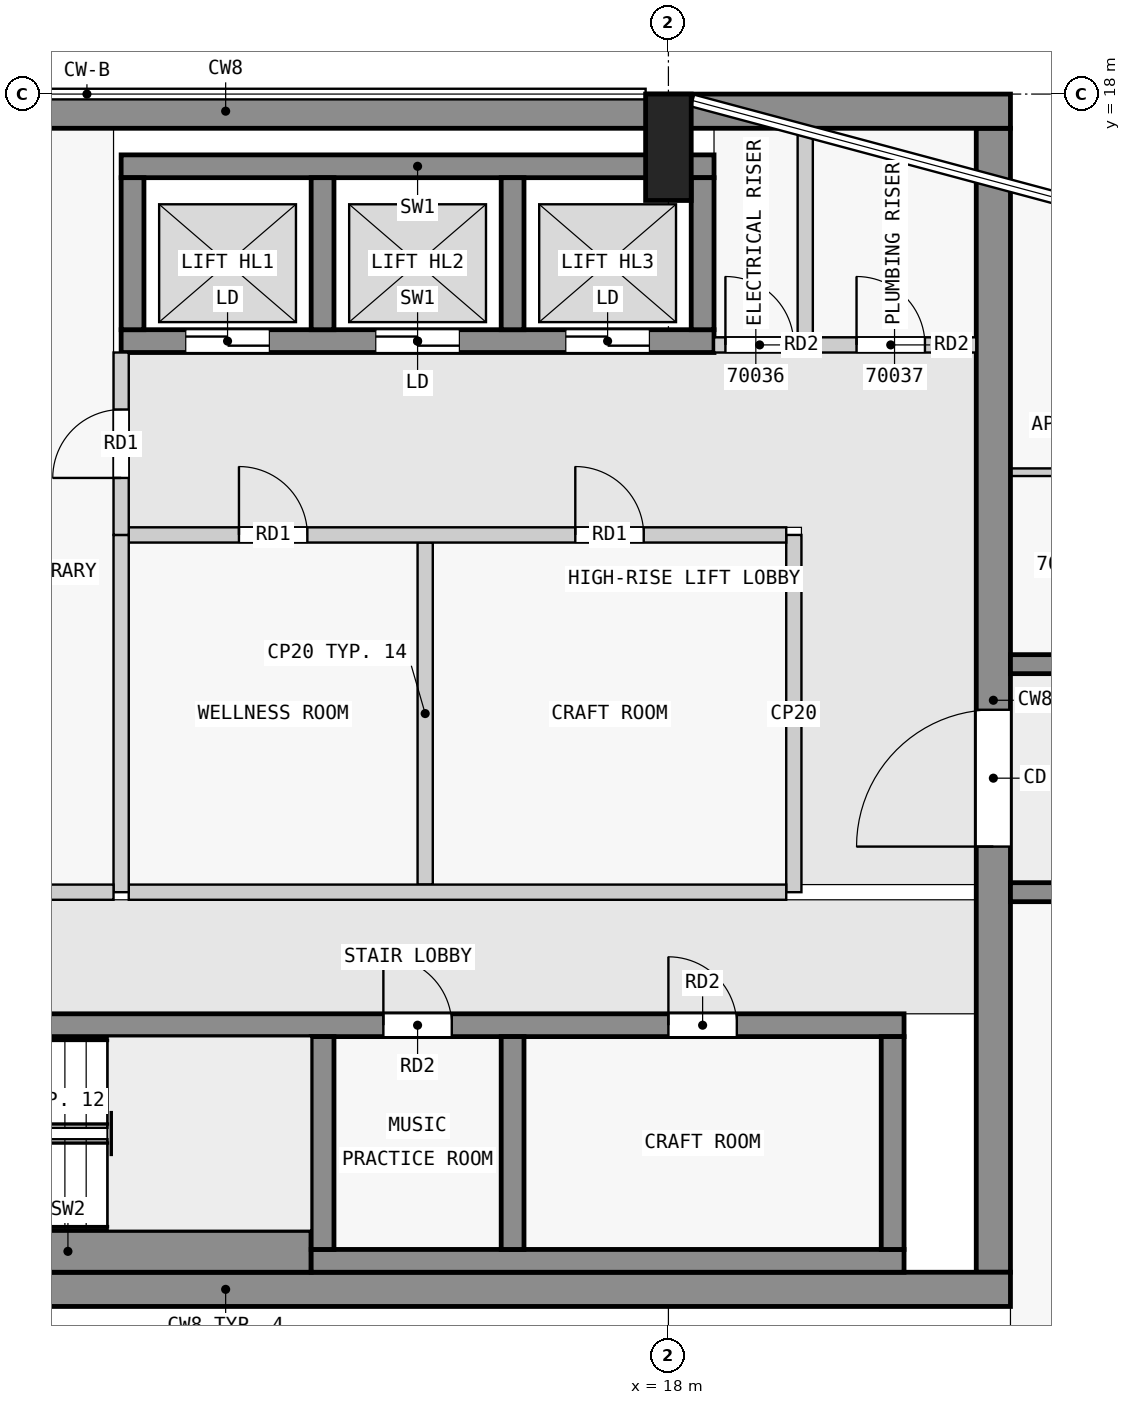
"""IFC4 building model, lengths in metres.
Left out: names, types, materials, properties, quantities, classifications, styles, units other than length and angle.
Written with IfcOpenShell. Run it as: python <this file> out.ifc"""

import sys

from ifc_helpers import new_model, si_unit, direction, frame, frame_2d, origin, origin_2d, place, context, subcontext, project, spatial, rectangle, extrude, element, fill, save


model = new_model("IFC4")
c1 = context("Model", 3, precision=1e-05, world=origin(), true_north=direction((0.0, 1.0)))
c2 = subcontext(c1, "Body", "Model", "MODEL_VIEW")
j1 = project(units=[si_unit("LENGTHUNIT", "METRE"), si_unit("PLANEANGLEUNIT", "RADIAN")], contexts=[c1])
p1 = place(None, origin())
s1 = spatial("IfcSite", under=j1, at=p1, CompositionType="ELEMENT")
p2 = place(p1, origin())
s2 = spatial("IfcBuilding", under=s1, at=p2, CompositionType="ELEMENT")
p3 = place(p2, frame((0.0, 0.0, 266.9)))
s3 = spatial("IfcBuildingStorey", under=s2, at=p3, CompositionType="ELEMENT", Elevation=266.9)
p4 = place(p3, frame((18.0, 17.3, 0.0), z_axis=(0.0, 0.0, 1.0), x_axis=(1.0, 0.0, 0.0)))
e1 = element("IfcColumn", 1, at=p4, inside=s3, PredefinedType="COLUMN", context=c2, shape_type="SweptSolid", body=[
    extrude(rectangle(XDim=0.6, YDim=1.4, at=origin_2d()), origin(), (0.0, 0.0, 1.0), 3.5),
])
for number, where, z_axis, x_axis in (
    (2, (1.85, 2.275, 0.0), (0.0, 0.0, 1.0), (1.0, 0.0, 0.0)),
    (3, (1.85, 17.775, 0.0), (0.0, 0.0, 1.0), (1.0, 0.0, 0.0)),
):
    element("IfcWall", number, at=place(p3, frame(where, z_axis=z_axis, x_axis=x_axis)), inside=s3, PredefinedType="SHEAR", context=c2, shape_type="SweptSolid", body=[
        extrude(rectangle(XDim=20.65, YDim=0.45, at=frame_2d((10.325, 0.0))), origin(), (0.0, 0.0, 1.0), 3.25),
    ])
p5 = place(p3, frame((22.275, 2.5, 0.0), z_axis=(0.0, 0.0, 1.0), x_axis=(0.0, 1.0, 0.0)))
e4 = element("IfcWall", 4, at=p5, inside=s3, PredefinedType="SHEAR", context=c2, shape_type="SweptSolid", body=[
    extrude(rectangle(XDim=15.05, YDim=0.45, at=frame_2d((7.525, 0.0))), origin(), (0.0, 0.0, 1.0), 3.25),
])
p6 = place(p5, frame((5.6, 0.0, 0.0)))
e5 = element("IfcOpeningElement", 5, at=p6, cuts=e4, PredefinedType="OPENING", context=c2, shape_type="SweptSolid", body=[
    extrude(rectangle(XDim=1.8, YDim=2.1, at=frame_2d((0.9, 1.05))), frame((0.0, 0.235, 0.0), z_axis=(0.0, -1.0, 0.0), x_axis=(1.0, 0.0, 0.0)), (0.0, 0.0, 1.0), 0.47),
])
p7 = place(p3, frame((6.9, 2.775, 0.0), z_axis=(0.0, 0.0, 1.0), x_axis=(1.0, 0.0, 0.0)))
e6 = element("IfcWall", 6, at=p7, inside=s3, PredefinedType="SHEAR", context=c2, shape_type="SweptSolid", body=[
    extrude(rectangle(XDim=6.4, YDim=0.55, at=frame_2d((3.2, 0.0))), origin(), (0.0, 0.0, 1.0), 3.25),
])
p8 = place(p3, frame((13.3, 2.65, 0.0), z_axis=(0.0, 0.0, 1.0), x_axis=(1.0, 0.0, 0.0)))
e7 = element("IfcWall", 7, at=p8, inside=s3, PredefinedType="SHEAR", context=c2, shape_type="SweptSolid", body=[
    extrude(rectangle(XDim=7.8, YDim=0.3, at=frame_2d((3.9, 0.0))), origin(), (0.0, 0.0, 1.0), 3.25),
])
for number, where, z_axis, x_axis in (
    (8, (13.45, 2.8, 0.0), (0.0, 0.0, 1.0), (0.0, 1.0, 0.0)),
    (9, (15.95, 2.8, 0.0), (0.0, 0.0, 1.0), (0.0, 1.0, 0.0)),
    (10, (20.95, 2.8, 0.0), (0.0, 0.0, 1.0), (0.0, 1.0, 0.0)),
):
    element("IfcWall", number, at=place(p3, frame(where, z_axis=z_axis, x_axis=x_axis)), inside=s3, PredefinedType="SHEAR", context=c2, shape_type="SweptSolid", body=[
        extrude(rectangle(XDim=2.8, YDim=0.3, at=frame_2d((1.4, 0.0))), origin(), (0.0, 0.0, 1.0), 3.25),
    ])
p9 = place(p3, frame((2.3, 5.75, 0.0), z_axis=(0.0, 0.0, 1.0), x_axis=(1.0, 0.0, 0.0)))
e11 = element("IfcWall", 11, at=p9, inside=s3, PredefinedType="SHEAR", context=c2, shape_type="SweptSolid", body=[
    extrude(rectangle(XDim=18.8, YDim=0.3, at=frame_2d((9.4, 0.0))), origin(), (0.0, 0.0, 1.0), 3.25),
])
p10 = place(p9, frame((4.65, 0.0, 0.0)))
e12 = element("IfcOpeningElement", 12, at=p10, cuts=e11, PredefinedType="OPENING", context=c2, shape_type="SweptSolid", body=[
    extrude(rectangle(XDim=1.1, YDim=2.1, at=frame_2d((0.55, 1.05))), frame((0.0, 0.16, 0.0), z_axis=(0.0, -1.0, 0.0), x_axis=(1.0, 0.0, 0.0)), (0.0, 0.0, 1.0), 0.32),
])
p11 = place(p9, frame((0.45, 0.0, 0.0)))
e13 = element("IfcOpeningElement", 13, at=p11, cuts=e11, PredefinedType="OPENING", context=c2, shape_type="SweptSolid", body=[
    extrude(rectangle(XDim=1.1, YDim=2.1, at=frame_2d((0.55, 1.05))), frame((0.0, 0.16, 0.0), z_axis=(0.0, -1.0, 0.0), x_axis=(1.0, 0.0, 0.0)), (0.0, 0.0, 1.0), 0.32),
])
p12 = place(p9, frame((2.75, 0.0, 0.0)))
e14 = element("IfcOpeningElement", 14, at=p12, cuts=e11, PredefinedType="OPENING", context=c2, shape_type="SweptSolid", body=[
    extrude(rectangle(XDim=1.1, YDim=2.1, at=frame_2d((0.55, 1.05))), frame((0.0, 0.16, 0.0), z_axis=(0.0, -1.0, 0.0), x_axis=(1.0, 0.0, 0.0)), (0.0, 0.0, 1.0), 0.32),
])
p13 = place(p9, frame((11.95, 0.0, 0.0)))
e15 = element("IfcOpeningElement", 15, at=p13, cuts=e11, PredefinedType="OPENING", context=c2, shape_type="SweptSolid", body=[
    extrude(rectangle(XDim=0.9, YDim=2.1, at=frame_2d((0.45, 1.05))), frame((0.0, 0.16, 0.0), z_axis=(0.0, -1.0, 0.0), x_axis=(1.0, 0.0, 0.0)), (0.0, 0.0, 1.0), 0.32),
])
p14 = place(p9, frame((15.7, 0.0, 0.0)))
e16 = element("IfcOpeningElement", 16, at=p14, cuts=e11, PredefinedType="OPENING", context=c2, shape_type="SweptSolid", body=[
    extrude(rectangle(XDim=0.9, YDim=2.1, at=frame_2d((0.45, 1.05))), frame((0.0, 0.16, 0.0), z_axis=(0.0, -1.0, 0.0), x_axis=(1.0, 0.0, 0.0)), (0.0, 0.0, 1.0), 0.32),
])
p15 = place(p3, frame((10.8, 17.05, 0.0), z_axis=(0.0, 0.0, 1.0), x_axis=(1.0, 0.0, 0.0)))
e17 = element("IfcWall", 17, at=p15, inside=s3, PredefinedType="SHEAR", context=c2, shape_type="SweptSolid", body=[
    extrude(rectangle(XDim=7.8, YDim=0.3, at=frame_2d((3.9, 0.0))), origin(), (0.0, 0.0, 1.0), 3.25),
])
p16 = place(p3, frame((10.8, 14.75, 0.0), z_axis=(0.0, 0.0, 1.0), x_axis=(1.0, 0.0, 0.0)))
e18 = element("IfcWall", 18, at=p16, inside=s3, PredefinedType="SHEAR", context=c2, shape_type="SweptSolid", body=[
    extrude(rectangle(XDim=7.8, YDim=0.3, at=frame_2d((3.9, 0.0))), origin(), (0.0, 0.0, 1.0), 3.25),
])
p17 = place(p16, frame((0.85, 0.0, 0.0)))
e19 = element("IfcOpeningElement", 19, at=p17, cuts=e18, PredefinedType="OPENING", context=c2, shape_type="SweptSolid", body=[
    extrude(rectangle(XDim=1.1, YDim=2.1, at=frame_2d((0.55, 1.05))), frame((0.0, 0.16, 0.0), z_axis=(0.0, -1.0, 0.0), x_axis=(1.0, 0.0, 0.0)), (0.0, 0.0, 1.0), 0.32),
])
p18 = place(p16, frame((3.35, 0.0, 0.0)))
e20 = element("IfcOpeningElement", 20, at=p18, cuts=e18, PredefinedType="OPENING", context=c2, shape_type="SweptSolid", body=[
    extrude(rectangle(XDim=1.1, YDim=2.1, at=frame_2d((0.55, 1.05))), frame((0.0, 0.16, 0.0), z_axis=(0.0, -1.0, 0.0), x_axis=(1.0, 0.0, 0.0)), (0.0, 0.0, 1.0), 0.32),
])
p19 = place(p16, frame((5.85, 0.0, 0.0)))
e21 = element("IfcOpeningElement", 21, at=p19, cuts=e18, PredefinedType="OPENING", context=c2, shape_type="SweptSolid", body=[
    extrude(rectangle(XDim=1.1, YDim=2.1, at=frame_2d((0.55, 1.05))), frame((0.0, 0.16, 0.0), z_axis=(0.0, -1.0, 0.0), x_axis=(1.0, 0.0, 0.0)), (0.0, 0.0, 1.0), 0.32),
])
for number, where, z_axis, x_axis in (
    (22, (10.95, 14.9, 0.0), (0.0, 0.0, 1.0), (0.0, 1.0, 0.0)),
    (23, (13.45, 14.9, 0.0), (0.0, 0.0, 1.0), (0.0, 1.0, 0.0)),
    (24, (15.95, 14.9, 0.0), (0.0, 0.0, 1.0), (0.0, 1.0, 0.0)),
    (25, (18.45, 14.9, 0.0), (0.0, 0.0, 1.0), (0.0, 1.0, 0.0)),
):
    element("IfcWall", number, at=place(p3, frame(where, z_axis=z_axis, x_axis=x_axis)), inside=s3, PredefinedType="SHEAR", context=c2, shape_type="SweptSolid", body=[
        extrude(rectangle(XDim=2.0, YDim=0.3, at=frame_2d((1.0, 0.0))), origin(), (0.0, 0.0, 1.0), 3.25),
    ])
p20 = place(p3, frame((22.5, 7.5, 0.0), z_axis=(0.0, 0.0, 1.0), x_axis=(1.0, 0.0, 0.0)))
e26 = element("IfcWall", 26, at=p20, inside=s3, PredefinedType="SHEAR", context=c2, shape_type="SweptSolid", body=[
    extrude(rectangle(XDim=22.5, YDim=0.25, at=frame_2d((11.25, 0.0))), origin(), (0.0, 0.0, 1.0), 3.25),
])
p21 = place(p20, frame((1.75, 0.0, 0.0)))
e27 = element("IfcOpeningElement", 27, at=p21, cuts=e26, PredefinedType="OPENING", context=c2, shape_type="SweptSolid", body=[
    extrude(rectangle(XDim=1.0, YDim=2.1, at=frame_2d((0.5, 1.05))), frame((0.0, 0.135, 0.0), z_axis=(0.0, -1.0, 0.0), x_axis=(1.0, 0.0, 0.0)), (0.0, 0.0, 1.0), 0.27),
])
p22 = place(p20, frame((6.25, 0.0, 0.0)))
e28 = element("IfcOpeningElement", 28, at=p22, cuts=e26, PredefinedType="OPENING", context=c2, shape_type="SweptSolid", body=[
    extrude(rectangle(XDim=1.0, YDim=2.1, at=frame_2d((0.5, 1.05))), frame((0.0, 0.135, 0.0), z_axis=(0.0, -1.0, 0.0), x_axis=(1.0, 0.0, 0.0)), (0.0, 0.0, 1.0), 0.27),
])
p23 = place(p20, frame((10.35, 0.0, 0.0)))
e29 = element("IfcOpeningElement", 29, at=p23, cuts=e26, PredefinedType="OPENING", context=c2, shape_type="SweptSolid", body=[
    extrude(rectangle(XDim=1.8, YDim=2.1, at=frame_2d((0.9, 1.05))), frame((0.0, 0.135, 0.0), z_axis=(0.0, -1.0, 0.0), x_axis=(1.0, 0.0, 0.0)), (0.0, 0.0, 1.0), 0.27),
])
p24 = place(p20, frame((15.25, 0.0, 0.0)))
e30 = element("IfcOpeningElement", 30, at=p24, cuts=e26, PredefinedType="OPENING", context=c2, shape_type="SweptSolid", body=[
    extrude(rectangle(XDim=1.0, YDim=2.1, at=frame_2d((0.5, 1.05))), frame((0.0, 0.135, 0.0), z_axis=(0.0, -1.0, 0.0), x_axis=(1.0, 0.0, 0.0)), (0.0, 0.0, 1.0), 0.27),
])
p25 = place(p20, frame((18.75, 0.0, 0.0)))
e31 = element("IfcOpeningElement", 31, at=p25, cuts=e26, PredefinedType="OPENING", context=c2, shape_type="SweptSolid", body=[
    extrude(rectangle(XDim=0.9, YDim=2.1, at=frame_2d((0.45, 1.05))), frame((0.0, 0.135, 0.0), z_axis=(0.0, -1.0, 0.0), x_axis=(1.0, 0.0, 0.0)), (0.0, 0.0, 1.0), 0.27),
])
p26 = place(p20, frame((20.95, 0.0, 0.0)))
e32 = element("IfcOpeningElement", 32, at=p26, cuts=e26, PredefinedType="OPENING", context=c2, shape_type="SweptSolid", body=[
    extrude(rectangle(XDim=1.0, YDim=2.1, at=frame_2d((0.5, 1.05))), frame((0.0, 0.135, 0.0), z_axis=(0.0, -1.0, 0.0), x_axis=(1.0, 0.0, 0.0)), (0.0, 0.0, 1.0), 0.27),
])
p27 = place(p3, frame((22.5, 10.5, 0.0), z_axis=(0.0, 0.0, 1.0), x_axis=(1.0, 0.0, 0.0)))
e33 = element("IfcWall", 33, at=p27, inside=s3, PredefinedType="SHEAR", context=c2, shape_type="SweptSolid", body=[
    extrude(rectangle(XDim=22.5, YDim=0.25, at=frame_2d((11.25, 0.0))), origin(), (0.0, 0.0, 1.0), 3.25),
])
p28 = place(p27, frame((1.75, 0.0, 0.0)))
e34 = element("IfcOpeningElement", 34, at=p28, cuts=e33, PredefinedType="OPENING", context=c2, shape_type="SweptSolid", body=[
    extrude(rectangle(XDim=1.0, YDim=2.1, at=frame_2d((0.5, 1.05))), frame((0.0, 0.135, 0.0), z_axis=(0.0, -1.0, 0.0), x_axis=(1.0, 0.0, 0.0)), (0.0, 0.0, 1.0), 0.27),
])
p29 = place(p27, frame((8.55, 0.0, 0.0)))
e35 = element("IfcOpeningElement", 35, at=p29, cuts=e33, PredefinedType="OPENING", context=c2, shape_type="SweptSolid", body=[
    extrude(rectangle(XDim=1.0, YDim=2.1, at=frame_2d((0.5, 1.05))), frame((0.0, 0.135, 0.0), z_axis=(0.0, -1.0, 0.0), x_axis=(1.0, 0.0, 0.0)), (0.0, 0.0, 1.0), 0.27),
])
p30 = place(p27, frame((16.85, 0.0, 0.0)))
e36 = element("IfcOpeningElement", 36, at=p30, cuts=e33, PredefinedType="OPENING", context=c2, shape_type="SweptSolid", body=[
    extrude(rectangle(XDim=1.0, YDim=2.1, at=frame_2d((0.5, 1.05))), frame((0.0, 0.135, 0.0), z_axis=(0.0, -1.0, 0.0), x_axis=(1.0, 0.0, 0.0)), (0.0, 0.0, 1.0), 0.27),
])
p31 = place(p3, frame((7.1, 7.5, 0.0), z_axis=(0.0, 0.0, 1.0), x_axis=(1.0, 0.0, 0.0)))
e37 = element("IfcWall", 37, at=p31, inside=s3, PredefinedType="PARTITIONING", context=c2, shape_type="SweptSolid", body=[
    extrude(rectangle(XDim=3.6, YDim=0.2, at=frame_2d((1.8, 0.0))), origin(), (0.0, 0.0, 1.0), 3.25),
])
p32 = place(p3, frame((10.8, 12.2, 0.0), z_axis=(0.0, 0.0, 1.0), x_axis=(0.0, 1.0, 0.0)))
e38 = element("IfcWall", 38, at=p32, inside=s3, PredefinedType="PARTITIONING", context=c2, shape_type="SweptSolid", body=[
    extrude(rectangle(XDim=2.4, YDim=0.2, at=frame_2d((1.2, 0.0))), origin(), (0.0, 0.0, 1.0), 3.25),
])
p33 = place(p32, frame((0.75, 0.0, 0.0)))
e39 = element("IfcOpeningElement", 39, at=p33, cuts=e38, PredefinedType="OPENING", context=c2, shape_type="SweptSolid", body=[
    extrude(rectangle(XDim=0.9, YDim=2.1, at=frame_2d((0.45, 1.05))), frame((0.0, 0.11, 0.0), z_axis=(0.0, -1.0, 0.0), x_axis=(1.0, 0.0, 0.0)), (0.0, 0.0, 1.0), 0.22),
])
p34 = place(p3, frame((10.8, 7.5, 0.0), z_axis=(0.0, 0.0, 1.0), x_axis=(0.0, 1.0, 0.0)))
e40 = element("IfcWall", 40, at=p34, inside=s3, PredefinedType="PARTITIONING", context=c2, shape_type="SweptSolid", body=[
    extrude(rectangle(XDim=4.7, YDim=0.2, at=frame_2d((2.35, 0.0))), origin(), (0.0, 0.0, 1.0), 3.25),
])
p35 = place(p3, frame((10.9, 7.5, 0.0), z_axis=(0.0, 0.0, 1.0), x_axis=(1.0, 0.0, 0.0)))
e41 = element("IfcWall", 41, at=p35, inside=s3, PredefinedType="PARTITIONING", context=c2, shape_type="SweptSolid", body=[
    extrude(rectangle(XDim=8.65, YDim=0.2, at=frame_2d((4.325, 0.0))), origin(), (0.0, 0.0, 1.0), 3.25),
])
p36 = place(p3, frame((19.65, 7.5, 0.0), z_axis=(0.0, 0.0, 1.0), x_axis=(0.0, 1.0, 0.0)))
e42 = element("IfcWall", 42, at=p36, inside=s3, PredefinedType="PARTITIONING", context=c2, shape_type="SweptSolid", body=[
    extrude(rectangle(XDim=4.7, YDim=0.2, at=frame_2d((2.35, 0.0))), origin(), (0.0, 0.0, 1.0), 3.25),
])
p37 = place(p3, frame((10.9, 12.2, 0.0), z_axis=(0.0, 0.0, 1.0), x_axis=(1.0, 0.0, 0.0)))
e43 = element("IfcWall", 43, at=p37, inside=s3, PredefinedType="PARTITIONING", context=c2, shape_type="SweptSolid", body=[
    extrude(rectangle(XDim=8.65, YDim=0.2, at=frame_2d((4.325, 0.0))), origin(), (0.0, 0.0, 1.0), 3.25),
])
p38 = place(p37, frame((1.45, 0.0, 0.0)))
e44 = element("IfcOpeningElement", 44, at=p38, cuts=e43, PredefinedType="OPENING", context=c2, shape_type="SweptSolid", body=[
    extrude(rectangle(XDim=0.9, YDim=2.1, at=frame_2d((0.45, 1.05))), frame((0.0, 0.11, 0.0), z_axis=(0.0, -1.0, 0.0), x_axis=(1.0, 0.0, 0.0)), (0.0, 0.0, 1.0), 0.22),
])
p39 = place(p37, frame((5.875, 0.0, 0.0)))
e45 = element("IfcOpeningElement", 45, at=p39, cuts=e43, PredefinedType="OPENING", context=c2, shape_type="SweptSolid", body=[
    extrude(rectangle(XDim=0.9, YDim=2.1, at=frame_2d((0.45, 1.05))), frame((0.0, 0.11, 0.0), z_axis=(0.0, -1.0, 0.0), x_axis=(1.0, 0.0, 0.0)), (0.0, 0.0, 1.0), 0.22),
])
p40 = place(p3, frame((14.8, 7.6, 0.0), z_axis=(0.0, 0.0, 1.0), x_axis=(0.0, 1.0, 0.0)))
e46 = element("IfcWall", 46, at=p40, inside=s3, PredefinedType="PARTITIONING", context=c2, shape_type="SweptSolid", body=[
    extrude(rectangle(XDim=4.5, YDim=0.2, at=frame_2d((2.25, 0.0))), origin(), (0.0, 0.0, 1.0), 3.25),
])
p41 = place(p3, frame((18.6, 14.7, 0.0), z_axis=(0.0, 0.0, 1.0), x_axis=(1.0, 0.0, 0.0)))
e47 = element("IfcWall", 47, at=p41, inside=s3, PredefinedType="PARTITIONING", context=c2, shape_type="SweptSolid", body=[
    extrude(rectangle(XDim=3.45, YDim=0.2, at=frame_2d((1.725, 0.0))), origin(), (0.0, 0.0, 1.0), 3.25),
])
p42 = place(p41, frame((0.15, 0.0, 0.0)))
e48 = element("IfcOpeningElement", 48, at=p42, cuts=e47, PredefinedType="OPENING", context=c2, shape_type="SweptSolid", body=[
    extrude(rectangle(XDim=0.9, YDim=2.1, at=frame_2d((0.45, 1.05))), frame((0.0, 0.11, 0.0), z_axis=(0.0, -1.0, 0.0), x_axis=(1.0, 0.0, 0.0)), (0.0, 0.0, 1.0), 0.22),
])
p43 = place(p41, frame((1.875, 0.0, 0.0)))
e49 = element("IfcOpeningElement", 49, at=p43, cuts=e47, PredefinedType="OPENING", context=c2, shape_type="SweptSolid", body=[
    extrude(rectangle(XDim=0.9, YDim=2.1, at=frame_2d((0.45, 1.05))), frame((0.0, 0.11, 0.0), z_axis=(0.0, -1.0, 0.0), x_axis=(1.0, 0.0, 0.0)), (0.0, 0.0, 1.0), 0.22),
])
p44 = place(p3, frame((19.8, 14.8, 0.0), z_axis=(0.0, 0.0, 1.0), x_axis=(0.0, 1.0, 0.0)))
e50 = element("IfcWall", 50, at=p44, inside=s3, PredefinedType="PARTITIONING", context=c2, shape_type="SweptSolid", body=[
    extrude(rectangle(XDim=2.75, YDim=0.2, at=frame_2d((1.375, 0.0))), origin(), (0.0, 0.0, 1.0), 3.25),
])
p45 = place(p3, frame((23.95, 13.025, 0.0), z_axis=(0.0, 0.0, 1.0), x_axis=(-1.0, 0.0, 0.0)))
e51 = element("IfcWall", 51, at=p45, inside=s3, PredefinedType="PARTITIONING", context=c2, shape_type="SweptSolid", body=[
    extrude(rectangle(XDim=1.45, YDim=0.1, at=frame_2d((0.725, 0.0))), origin(), (0.0, 0.0, 1.0), 3.25),
])
p46 = place(p33, origin())
e52 = element("IfcDoor", 52, at=p46, inside=s3, OperationType="SINGLE_SWING_LEFT", PredefinedType="DOOR", context=c2, shape_type="SweptSolid", body=[
    extrude(rectangle(XDim=0.9, YDim=2.1, at=frame_2d((0.45, 1.05))), frame((0.0, 0.025, 0.0), z_axis=(0.0, -1.0, 0.0), x_axis=(1.0, 0.0, 0.0)), (0.0, 0.0, 1.0), 0.05),
])
fill(e39, e52)
p47 = place(p38, origin())
e53 = element("IfcDoor", 53, at=p47, inside=s3, OperationType="SINGLE_SWING_LEFT", PredefinedType="DOOR", context=c2, shape_type="SweptSolid", body=[
    extrude(rectangle(XDim=0.9, YDim=2.1, at=frame_2d((0.45, 1.05))), frame((0.0, 0.025, 0.0), z_axis=(0.0, -1.0, 0.0), x_axis=(1.0, 0.0, 0.0)), (0.0, 0.0, 1.0), 0.05),
])
fill(e44, e53)
p48 = place(p39, origin())
e54 = element("IfcDoor", 54, at=p48, inside=s3, OperationType="SINGLE_SWING_LEFT", PredefinedType="DOOR", context=c2, shape_type="SweptSolid", body=[
    extrude(rectangle(XDim=0.9, YDim=2.1, at=frame_2d((0.45, 1.05))), frame((0.0, 0.025, 0.0), z_axis=(0.0, -1.0, 0.0), x_axis=(1.0, 0.0, 0.0)), (0.0, 0.0, 1.0), 0.05),
])
fill(e45, e54)
p49 = place(p17, origin())
e55 = element("IfcDoor", 55, at=p49, inside=s3, OperationType="DOUBLE_DOOR_SLIDING", PredefinedType="DOOR", context=c2, shape_type="SweptSolid", body=[
    extrude(rectangle(XDim=1.1, YDim=2.1, at=frame_2d((0.55, 1.05))), frame((0.0, 0.025, 0.0), z_axis=(0.0, -1.0, 0.0), x_axis=(1.0, 0.0, 0.0)), (0.0, 0.0, 1.0), 0.05),
])
fill(e19, e55)
p50 = place(p18, origin())
e56 = element("IfcDoor", 56, at=p50, inside=s3, OperationType="DOUBLE_DOOR_SLIDING", PredefinedType="DOOR", context=c2, shape_type="SweptSolid", body=[
    extrude(rectangle(XDim=1.1, YDim=2.1, at=frame_2d((0.55, 1.05))), frame((0.0, 0.025, 0.0), z_axis=(0.0, -1.0, 0.0), x_axis=(1.0, 0.0, 0.0)), (0.0, 0.0, 1.0), 0.05),
])
fill(e20, e56)
p51 = place(p19, origin())
e57 = element("IfcDoor", 57, at=p51, inside=s3, OperationType="DOUBLE_DOOR_SLIDING", PredefinedType="DOOR", context=c2, shape_type="SweptSolid", body=[
    extrude(rectangle(XDim=1.1, YDim=2.1, at=frame_2d((0.55, 1.05))), frame((0.0, 0.025, 0.0), z_axis=(0.0, -1.0, 0.0), x_axis=(1.0, 0.0, 0.0)), (0.0, 0.0, 1.0), 0.05),
])
fill(e21, e57)
p52 = place(p6, origin())
e58 = element("IfcDoor", 58, at=p52, inside=s3, OperationType="DOUBLE_DOOR_SINGLE_SWING", PredefinedType="DOOR", context=c2, shape_type="SweptSolid", body=[
    extrude(rectangle(XDim=1.8, YDim=2.1, at=frame_2d((0.9, 1.05))), frame((0.0, 0.025, 0.0), z_axis=(0.0, -1.0, 0.0), x_axis=(1.0, 0.0, 0.0)), (0.0, 0.0, 1.0), 0.05),
])
fill(e5, e58)
p53 = place(p42, origin())
e59 = element("IfcDoor", 59, at=p53, inside=s3, OperationType="SINGLE_SWING_LEFT", PredefinedType="DOOR", context=c2, shape_type="SweptSolid", body=[
    extrude(rectangle(XDim=0.9, YDim=2.1, at=frame_2d((0.45, 1.05))), frame((0.0, 0.025, 0.0), z_axis=(0.0, -1.0, 0.0), x_axis=(1.0, 0.0, 0.0)), (0.0, 0.0, 1.0), 0.05),
])
fill(e48, e59)
p54 = place(p43, origin())
e60 = element("IfcDoor", 60, at=p54, inside=s3, OperationType="SINGLE_SWING_LEFT", PredefinedType="DOOR", context=c2, shape_type="SweptSolid", body=[
    extrude(rectangle(XDim=0.9, YDim=2.1, at=frame_2d((0.45, 1.05))), frame((0.0, 0.025, 0.0), z_axis=(0.0, -1.0, 0.0), x_axis=(1.0, 0.0, 0.0)), (0.0, 0.0, 1.0), 0.05),
])
fill(e49, e60)
p55 = place(p13, origin())
e61 = element("IfcDoor", 61, at=p55, inside=s3, OperationType="SINGLE_SWING_LEFT", PredefinedType="DOOR", context=c2, shape_type="SweptSolid", body=[
    extrude(rectangle(XDim=0.9, YDim=2.1, at=frame_2d((0.45, 1.05))), frame((0.0, 0.025, 0.0), z_axis=(0.0, -1.0, 0.0), x_axis=(1.0, 0.0, 0.0)), (0.0, 0.0, 1.0), 0.05),
])
fill(e15, e61)
p56 = place(p14, origin())
e62 = element("IfcDoor", 62, at=p56, inside=s3, OperationType="SINGLE_SWING_LEFT", PredefinedType="DOOR", context=c2, shape_type="SweptSolid", body=[
    extrude(rectangle(XDim=0.9, YDim=2.1, at=frame_2d((0.45, 1.05))), frame((0.0, 0.025, 0.0), z_axis=(0.0, -1.0, 0.0), x_axis=(1.0, 0.0, 0.0)), (0.0, 0.0, 1.0), 0.05),
])
fill(e16, e62)
save(model, sys.argv[1])
